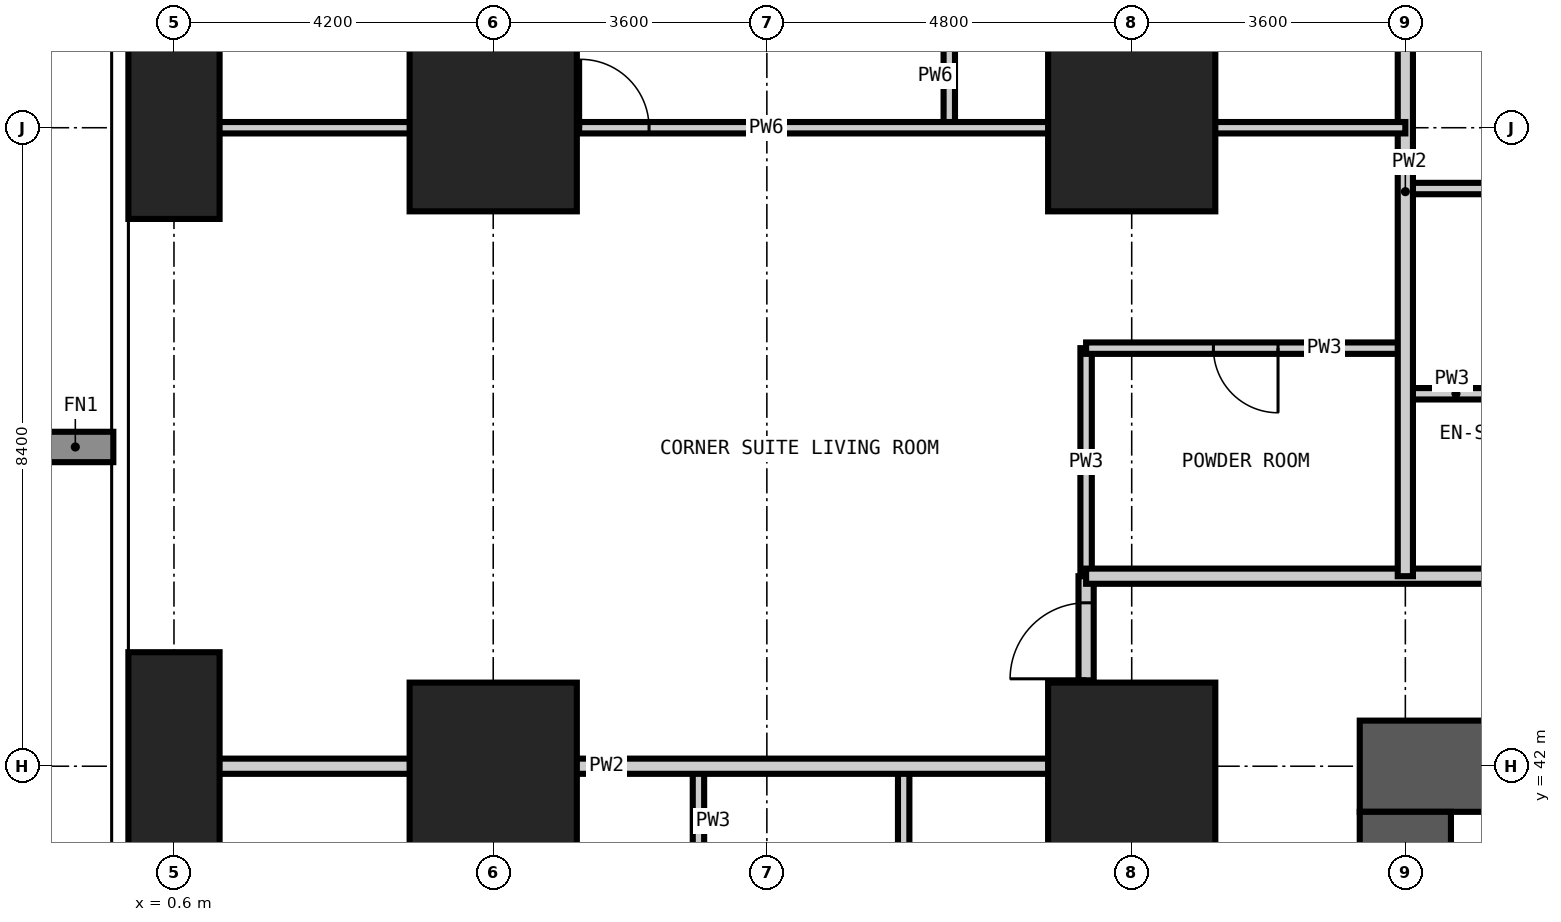
"""IFC4 building model, lengths in metres.
Left out: names, types, materials, properties, quantities, classifications, styles, units other than length and angle.
Written with IfcOpenShell. Run it as: python <this file> out.ifc"""

import sys

from ifc_helpers import new_model, si_unit, direction, frame, frame_2d, origin, origin_2d, place, context, subcontext, project, spatial, rectangle, extrude, element, fill, save


model = new_model("IFC4")
c1 = context("Model", 3, precision=1e-05, world=origin(), true_north=direction((0.0, 1.0)))
c2 = subcontext(c1, "Body", "Model", "MODEL_VIEW")
j1 = project(units=[si_unit("LENGTHUNIT", "METRE"), si_unit("PLANEANGLEUNIT", "RADIAN")], contexts=[c1])
p1 = place(None, origin())
s1 = spatial("IfcSite", under=j1, at=p1, CompositionType="ELEMENT")
p2 = place(p1, origin())
s2 = spatial("IfcBuilding", under=s1, at=p2, CompositionType="ELEMENT")
p3 = place(p2, frame((0.0, 0.0, 144.0)))
s3 = spatial("IfcBuildingStorey", under=s2, at=p3, CompositionType="ELEMENT", Elevation=144.0)
p4 = place(p3, frame((0.6, 42.0, -0.35), z_axis=(0.0, 0.0, 1.0), x_axis=(1.0, 0.0, 0.0)))
e1 = element("IfcColumn", 1, at=p4, inside=s3, PredefinedType="COLUMN", context=c2, shape_type="SweptSolid", body=[
    extrude(rectangle(XDim=1.2, YDim=3.0, at=origin_2d()), origin(), (0.0, 0.0, 1.0), 3.6),
])
p5 = place(p3, frame((0.6, 50.4, -0.35), z_axis=(0.0, 0.0, 1.0), x_axis=(1.0, 0.0, 0.0)))
e2 = element("IfcColumn", 2, at=p5, inside=s3, PredefinedType="COLUMN", context=c2, shape_type="SweptSolid", body=[
    extrude(rectangle(XDim=1.2, YDim=2.4, at=origin_2d()), origin(), (0.0, 0.0, 1.0), 3.6),
])
for number, where, z_axis, x_axis in (
    (3, (4.8, 42.0, -0.35), (0.0, 0.0, 1.0), (1.0, 0.0, 0.0)),
    (4, (4.8, 50.4, -0.35), (0.0, 0.0, 1.0), (1.0, 0.0, 0.0)),
    (5, (13.2, 42.0, -0.35), (0.0, 0.0, 1.0), (1.0, 0.0, 0.0)),
    (6, (13.2, 50.4, -0.35), (0.0, 0.0, 1.0), (1.0, 0.0, 0.0)),
):
    element("IfcColumn", number, at=place(p3, frame(where, z_axis=z_axis, x_axis=x_axis)), inside=s3, PredefinedType="COLUMN", context=c2, shape_type="SweptSolid", body=[
        extrude(rectangle(XDim=2.2, YDim=2.2, at=origin_2d()), origin(), (0.0, 0.0, 1.0), 3.6),
    ])
p6 = place(p3, frame((42.6, 42.0, -0.35), z_axis=(0.0, 0.0, 1.0), x_axis=(-1.0, 0.0, 0.0)))
e7 = element("IfcWall", 7, at=p6, inside=s3, PredefinedType="SHEAR", context=c2, shape_type="SweptSolid", body=[
    extrude(rectangle(XDim=26.4, YDim=1.2, at=frame_2d((13.2, 0.0))), origin(), (0.0, 0.0, 1.0), 3.6),
])
p7 = place(p6, frame((21.1, 0.0, 0.35)))
e8 = element("IfcOpeningElement", 8, at=p7, cuts=e7, PredefinedType="OPENING", context=c2, shape_type="SweptSolid", body=[
    extrude(rectangle(XDim=1.0, YDim=2.1, at=frame_2d((0.5, 1.05))), frame((0.0, 0.61, 0.0), z_axis=(0.0, -1.0, 0.0), x_axis=(1.0, 0.0, 0.0)), (0.0, 0.0, 1.0), 1.22),
])
p8 = place(p6, frame((10.5, 0.0, 0.35)))
e9 = element("IfcOpeningElement", 9, at=p8, cuts=e7, PredefinedType="OPENING", context=c2, shape_type="SweptSolid", body=[
    extrude(rectangle(XDim=1.2, YDim=2.2, at=frame_2d((0.6, 1.1))), frame((0.0, 0.61, 0.0), z_axis=(0.0, -1.0, 0.0), x_axis=(1.0, 0.0, 0.0)), (0.0, 0.0, 1.0), 1.22),
])
p9 = place(p3, frame((16.8, 41.4, -0.35), z_axis=(0.0, 0.0, 1.0), x_axis=(0.0, -1.0, 0.0)))
e10 = element("IfcWall", 10, at=p9, inside=s3, PredefinedType="SHEAR", context=c2, shape_type="SweptSolid", body=[
    extrude(rectangle(XDim=24.0, YDim=1.2, at=frame_2d((12.0, 0.0))), origin(), (0.0, 0.0, 1.0), 3.6),
])
p10 = place(p9, frame((11.1, 0.0, 0.35)))
e11 = element("IfcOpeningElement", 11, at=p10, cuts=e10, PredefinedType="OPENING", context=c2, shape_type="SweptSolid", body=[
    extrude(rectangle(XDim=1.8, YDim=2.2, at=frame_2d((0.9, 1.1))), frame((0.0, 0.61, 0.0), z_axis=(0.0, -1.0, 0.0), x_axis=(1.0, 0.0, 0.0)), (0.0, 0.0, 1.0), 1.22),
])
p11 = place(p9, frame((19.9, 0.0, 0.35)))
e12 = element("IfcOpeningElement", 12, at=p11, cuts=e10, PredefinedType="OPENING", context=c2, shape_type="SweptSolid", body=[
    extrude(rectangle(XDim=1.0, YDim=2.1, at=frame_2d((0.5, 1.05))), frame((0.0, 0.61, 0.0), z_axis=(0.0, -1.0, 0.0), x_axis=(1.0, 0.0, 0.0)), (0.0, 0.0, 1.0), 1.22),
])
p12 = place(p9, frame((5.2, 0.0, 0.35)))
e13 = element("IfcOpeningElement", 13, at=p12, cuts=e10, PredefinedType="OPENING", context=c2, shape_type="SweptSolid", body=[
    extrude(rectangle(XDim=1.0, YDim=2.1, at=frame_2d((0.5, 1.05))), frame((0.0, 0.61, 0.0), z_axis=(0.0, -1.0, 0.0), x_axis=(1.0, 0.0, 0.0)), (0.0, 0.0, 1.0), 1.22),
])
p13 = place(p3, frame((7.5, 39.0, 0.0), z_axis=(0.0, 0.0, 1.0), x_axis=(0.0, 1.0, 0.0)))
e14 = element("IfcWall", 14, at=p13, inside=s3, PredefinedType="PARTITIONING", context=c2, shape_type="SweptSolid", body=[
    extrude(rectangle(XDim=3.0, YDim=0.15, at=frame_2d((1.5, 0.0))), origin(), (0.0, 0.0, 1.0), 3.25),
])
p14 = place(p13, frame((1.075, 0.0, 0.0)))
e15 = element("IfcOpeningElement", 15, at=p14, cuts=e14, PredefinedType="OPENING", context=c2, shape_type="SweptSolid", body=[
    extrude(rectangle(XDim=0.85, YDim=2.1, at=frame_2d((0.425, 1.05))), frame((0.0, 0.085, 0.0), z_axis=(0.0, -1.0, 0.0), x_axis=(1.0, 0.0, 0.0)), (0.0, 0.0, 1.0), 0.17),
])
for number, where, z_axis, x_axis in (
    (16, (10.2, 39.0, 0.0), (0.0, 0.0, 1.0), (0.0, 1.0, 0.0)),
    (17, (12.6, 44.5, 0.0), (0.0, 0.0, 1.0), (0.0, 1.0, 0.0)),
):
    element("IfcWall", number, at=place(p3, frame(where, z_axis=z_axis, x_axis=x_axis)), inside=s3, PredefinedType="PARTITIONING", context=c2, shape_type="SweptSolid", body=[
        extrude(rectangle(XDim=3.0, YDim=0.15, at=frame_2d((1.5, 0.0))), origin(), (0.0, 0.0, 1.0), 3.25),
    ])
p15 = place(p3, frame((16.8, 46.9, 0.0), z_axis=(0.0, 0.0, 1.0), x_axis=(1.0, 0.0, 0.0)))
e18 = element("IfcWall", 18, at=p15, inside=s3, PredefinedType="PARTITIONING", context=c2, shape_type="SweptSolid", body=[
    extrude(rectangle(XDim=3.0, YDim=0.15, at=frame_2d((1.5, 0.0))), origin(), (0.0, 0.0, 1.0), 3.25),
])
p16 = place(p15, frame((1.075, 0.0, 0.0)))
e19 = element("IfcOpeningElement", 19, at=p16, cuts=e18, PredefinedType="OPENING", context=c2, shape_type="SweptSolid", body=[
    extrude(rectangle(XDim=0.85, YDim=2.1, at=frame_2d((0.425, 1.05))), frame((0.0, 0.085, 0.0), z_axis=(0.0, -1.0, 0.0), x_axis=(1.0, 0.0, 0.0)), (0.0, 0.0, 1.0), 0.17),
])
p17 = place(p3, frame((12.6, 47.5, 0.0), z_axis=(0.0, 0.0, 1.0), x_axis=(1.0, 0.0, 0.0)))
e20 = element("IfcWall", 20, at=p17, inside=s3, PredefinedType="PARTITIONING", context=c2, shape_type="SweptSolid", body=[
    extrude(rectangle(XDim=4.2, YDim=0.15, at=frame_2d((2.1, 0.0))), origin(), (0.0, 0.0, 1.0), 3.25),
])
p18 = place(p17, frame((1.675, 0.0, 0.0)))
e21 = element("IfcOpeningElement", 21, at=p18, cuts=e20, PredefinedType="OPENING", context=c2, shape_type="SweptSolid", body=[
    extrude(rectangle(XDim=0.85, YDim=2.1, at=frame_2d((0.425, 1.05))), frame((0.0, 0.085, 0.0), z_axis=(0.0, -1.0, 0.0), x_axis=(1.0, 0.0, 0.0)), (0.0, 0.0, 1.0), 0.17),
])
p19 = place(p3, frame((16.8, 49.6, 0.0), z_axis=(0.0, 0.0, 1.0), x_axis=(1.0, 0.0, 0.0)))
e22 = element("IfcWall", 22, at=p19, inside=s3, PredefinedType="PARTITIONING", context=c2, shape_type="SweptSolid", body=[
    extrude(rectangle(XDim=3.0, YDim=0.15, at=frame_2d((1.5, 0.0))), origin(), (0.0, 0.0, 1.0), 3.25),
])
p20 = place(p3, frame((12.6, 13.1, 0.0), z_axis=(0.0, 0.0, 1.0), x_axis=(0.0, 1.0, 0.0)))
e23 = element("IfcWall", 23, at=p20, inside=s3, PredefinedType="PARTITIONING", context=c2, shape_type="SweptSolid", body=[
    extrude(rectangle(XDim=31.4, YDim=0.2, at=frame_2d((15.7, 0.0))), origin(), (0.0, 0.0, 1.0), 3.25),
])
p21 = place(p20, frame((5.3, 0.0, 0.0)))
e24 = element("IfcOpeningElement", 24, at=p21, cuts=e23, PredefinedType="OPENING", context=c2, shape_type="SweptSolid", body=[
    extrude(rectangle(XDim=1.0, YDim=2.2, at=frame_2d((0.5, 1.1))), frame((0.0, 0.11, 0.0), z_axis=(0.0, -1.0, 0.0), x_axis=(1.0, 0.0, 0.0)), (0.0, 0.0, 1.0), 0.22),
])
p22 = place(p20, frame((13.3, 0.0, 0.0)))
e25 = element("IfcOpeningElement", 25, at=p22, cuts=e23, PredefinedType="OPENING", context=c2, shape_type="SweptSolid", body=[
    extrude(rectangle(XDim=1.0, YDim=2.2, at=frame_2d((0.5, 1.1))), frame((0.0, 0.11, 0.0), z_axis=(0.0, -1.0, 0.0), x_axis=(1.0, 0.0, 0.0)), (0.0, 0.0, 1.0), 0.22),
])
p23 = place(p20, frame((18.3, 0.0, 0.0)))
e26 = element("IfcOpeningElement", 26, at=p23, cuts=e23, PredefinedType="OPENING", context=c2, shape_type="SweptSolid", body=[
    extrude(rectangle(XDim=1.0, YDim=2.2, at=frame_2d((0.5, 1.1))), frame((0.0, 0.11, 0.0), z_axis=(0.0, -1.0, 0.0), x_axis=(1.0, 0.0, 0.0)), (0.0, 0.0, 1.0), 0.22),
])
p24 = place(p20, frame((26.3, 0.0, 0.0)))
e27 = element("IfcOpeningElement", 27, at=p24, cuts=e23, PredefinedType="OPENING", context=c2, shape_type="SweptSolid", body=[
    extrude(rectangle(XDim=1.0, YDim=2.2, at=frame_2d((0.5, 1.1))), frame((0.0, 0.11, 0.0), z_axis=(0.0, -1.0, 0.0), x_axis=(1.0, 0.0, 0.0)), (0.0, 0.0, 1.0), 0.22),
])
p25 = place(p20, frame((1.35, 0.0, 0.0)))
e28 = element("IfcOpeningElement", 28, at=p25, cuts=e23, PredefinedType="OPENING", context=c2, shape_type="SweptSolid", body=[
    extrude(rectangle(XDim=1.0, YDim=2.2, at=frame_2d((0.5, 1.1))), frame((0.0, 0.11, 0.0), z_axis=(0.0, -1.0, 0.0), x_axis=(1.0, 0.0, 0.0)), (0.0, 0.0, 1.0), 0.22),
])
p26 = place(p20, frame((30.05, 0.0, 0.0)))
e29 = element("IfcOpeningElement", 29, at=p26, cuts=e23, PredefinedType="OPENING", context=c2, shape_type="SweptSolid", body=[
    extrude(rectangle(XDim=1.0, YDim=2.2, at=frame_2d((0.5, 1.1))), frame((0.0, 0.11, 0.0), z_axis=(0.0, -1.0, 0.0), x_axis=(1.0, 0.0, 0.0)), (0.0, 0.0, 1.0), 0.22),
])
p27 = place(p3, frame((12.6, 44.5, 0.0), z_axis=(0.0, 0.0, 1.0), x_axis=(1.0, 0.0, 0.0)))
e30 = element("IfcWall", 30, at=p27, inside=s3, PredefinedType="PARTITIONING", context=c2, shape_type="SweptSolid", body=[
    extrude(rectangle(XDim=32.5, YDim=0.2, at=frame_2d((16.25, 0.0))), origin(), (0.0, 0.0, 1.0), 3.25),
])
p28 = place(p27, frame((5.8, 0.0, 0.0)))
e31 = element("IfcOpeningElement", 31, at=p28, cuts=e30, PredefinedType="OPENING", context=c2, shape_type="SweptSolid", body=[
    extrude(rectangle(XDim=1.0, YDim=2.2, at=frame_2d((0.5, 1.1))), frame((0.0, 0.11, 0.0), z_axis=(0.0, -1.0, 0.0), x_axis=(1.0, 0.0, 0.0)), (0.0, 0.0, 1.0), 0.22),
])
p29 = place(p27, frame((12.1, 0.0, 0.0)))
e32 = element("IfcOpeningElement", 32, at=p29, cuts=e30, PredefinedType="OPENING", context=c2, shape_type="SweptSolid", body=[
    extrude(rectangle(XDim=1.0, YDim=2.2, at=frame_2d((0.5, 1.1))), frame((0.0, 0.11, 0.0), z_axis=(0.0, -1.0, 0.0), x_axis=(1.0, 0.0, 0.0)), (0.0, 0.0, 1.0), 0.22),
])
p30 = place(p27, frame((20.5, 0.0, 0.0)))
e33 = element("IfcOpeningElement", 33, at=p30, cuts=e30, PredefinedType="OPENING", context=c2, shape_type="SweptSolid", body=[
    extrude(rectangle(XDim=1.0, YDim=2.2, at=frame_2d((0.5, 1.1))), frame((0.0, 0.11, 0.0), z_axis=(0.0, -1.0, 0.0), x_axis=(1.0, 0.0, 0.0)), (0.0, 0.0, 1.0), 0.22),
])
p31 = place(p27, frame((26.8, 0.0, 0.0)))
e34 = element("IfcOpeningElement", 34, at=p31, cuts=e30, PredefinedType="OPENING", context=c2, shape_type="SweptSolid", body=[
    extrude(rectangle(XDim=1.0, YDim=2.2, at=frame_2d((0.5, 1.1))), frame((0.0, 0.11, 0.0), z_axis=(0.0, -1.0, 0.0), x_axis=(1.0, 0.0, 0.0)), (0.0, 0.0, 1.0), 0.22),
])
p32 = place(p3, frame((16.8, 44.5, 0.0), z_axis=(0.0, 0.0, 1.0), x_axis=(0.0, 1.0, 0.0)))
e35 = element("IfcWall", 35, at=p32, inside=s3, PredefinedType="PARTITIONING", context=c2, shape_type="SweptSolid", body=[
    extrude(rectangle(XDim=10.118, YDim=0.2, at=frame_2d((5.059, 0.0))), origin(), (0.0, 0.0, 1.0), 3.25),
])
p33 = place(p3, frame((-0.018, 42.0, 0.0), z_axis=(0.0, 0.0, 1.0), x_axis=(1.0, 0.0, 0.0)))
e36 = element("IfcWall", 36, at=p33, inside=s3, PredefinedType="PARTITIONING", context=c2, shape_type="SweptSolid", body=[
    extrude(rectangle(XDim=12.618, YDim=0.2, at=frame_2d((6.309, 0.0))), origin(), (0.0, 0.0, 1.0), 3.25),
])
p34 = place(p3, frame((10.8, 50.4, 0.0), z_axis=(0.0, 0.0, 1.0), x_axis=(0.0, 1.0, 0.0)))
e37 = element("IfcWall", 37, at=p34, inside=s3, PredefinedType="PARTITIONING", context=c2, shape_type="SweptSolid", body=[
    extrude(rectangle(XDim=3.0, YDim=0.15, at=frame_2d((1.5, 0.0))), origin(), (0.0, 0.0, 1.0), 3.25),
])
p35 = place(p34, frame((1.05, 0.0, 0.0)))
e38 = element("IfcOpeningElement", 38, at=p35, cuts=e37, PredefinedType="OPENING", context=c2, shape_type="SweptSolid", body=[
    extrude(rectangle(XDim=0.9, YDim=2.1, at=frame_2d((0.45, 1.05))), frame((0.0, 0.085, 0.0), z_axis=(0.0, -1.0, 0.0), x_axis=(1.0, 0.0, 0.0)), (0.0, 0.0, 1.0), 0.17),
])
p36 = place(p3, frame((13.2, 50.4, 0.0), z_axis=(0.0, 0.0, 1.0), x_axis=(0.0, 1.0, 0.0)))
e39 = element("IfcWall", 39, at=p36, inside=s3, PredefinedType="PARTITIONING", context=c2, shape_type="SweptSolid", body=[
    extrude(rectangle(XDim=3.0, YDim=0.15, at=frame_2d((1.5, 0.0))), origin(), (0.0, 0.0, 1.0), 3.25),
])
p37 = place(p3, frame((-0.018, 50.4, 0.0), z_axis=(0.0, 0.0, 1.0), x_axis=(1.0, 0.0, 0.0)))
e40 = element("IfcWall", 40, at=p37, inside=s3, PredefinedType="PARTITIONING", context=c2, shape_type="SweptSolid", body=[
    extrude(rectangle(XDim=16.818, YDim=0.15, at=frame_2d((8.409, 0.0))), origin(), (0.0, 0.0, 1.0), 3.25),
])
p38 = place(p37, frame((5.968, 0.0, 0.0)))
e41 = element("IfcOpeningElement", 41, at=p38, cuts=e40, PredefinedType="OPENING", context=c2, shape_type="SweptSolid", body=[
    extrude(rectangle(XDim=0.9, YDim=2.1, at=frame_2d((0.45, 1.05))), frame((0.0, 0.085, 0.0), z_axis=(0.0, -1.0, 0.0), x_axis=(1.0, 0.0, 0.0)), (0.0, 0.0, 1.0), 0.17),
])
p39 = place(p26, origin())
e42 = element("IfcDoor", 42, at=p39, inside=s3, OperationType="SINGLE_SWING_LEFT", PredefinedType="DOOR", context=c2, shape_type="SweptSolid", body=[
    extrude(rectangle(XDim=1.0, YDim=2.2, at=frame_2d((0.5, 1.1))), frame((0.0, 0.025, 0.0), z_axis=(0.0, -1.0, 0.0), x_axis=(1.0, 0.0, 0.0)), (0.0, 0.0, 1.0), 0.05),
])
fill(e29, e42)
p40 = place(p18, frame((0.85, 0.0, 0.0), z_axis=(0.0, 0.0, 1.0), x_axis=(-1.0, 0.0, 0.0)))
e43 = element("IfcDoor", 43, at=p40, inside=s3, OperationType="SINGLE_SWING_LEFT", PredefinedType="DOOR", context=c2, shape_type="SweptSolid", body=[
    extrude(rectangle(XDim=0.85, YDim=2.1, at=frame_2d((0.425, 1.05))), frame((0.0, 0.025, 0.0), z_axis=(0.0, -1.0, 0.0), x_axis=(1.0, 0.0, 0.0)), (0.0, 0.0, 1.0), 0.05),
])
fill(e21, e43)
p41 = place(p38, origin())
e44 = element("IfcDoor", 44, at=p41, inside=s3, OperationType="SINGLE_SWING_LEFT", PredefinedType="DOOR", context=c2, shape_type="SweptSolid", body=[
    extrude(rectangle(XDim=0.9, YDim=2.1, at=frame_2d((0.45, 1.05))), frame((0.0, 0.025, 0.0), z_axis=(0.0, -1.0, 0.0), x_axis=(1.0, 0.0, 0.0)), (0.0, 0.0, 1.0), 0.05),
])
fill(e41, e44)
save(model, sys.argv[1])
